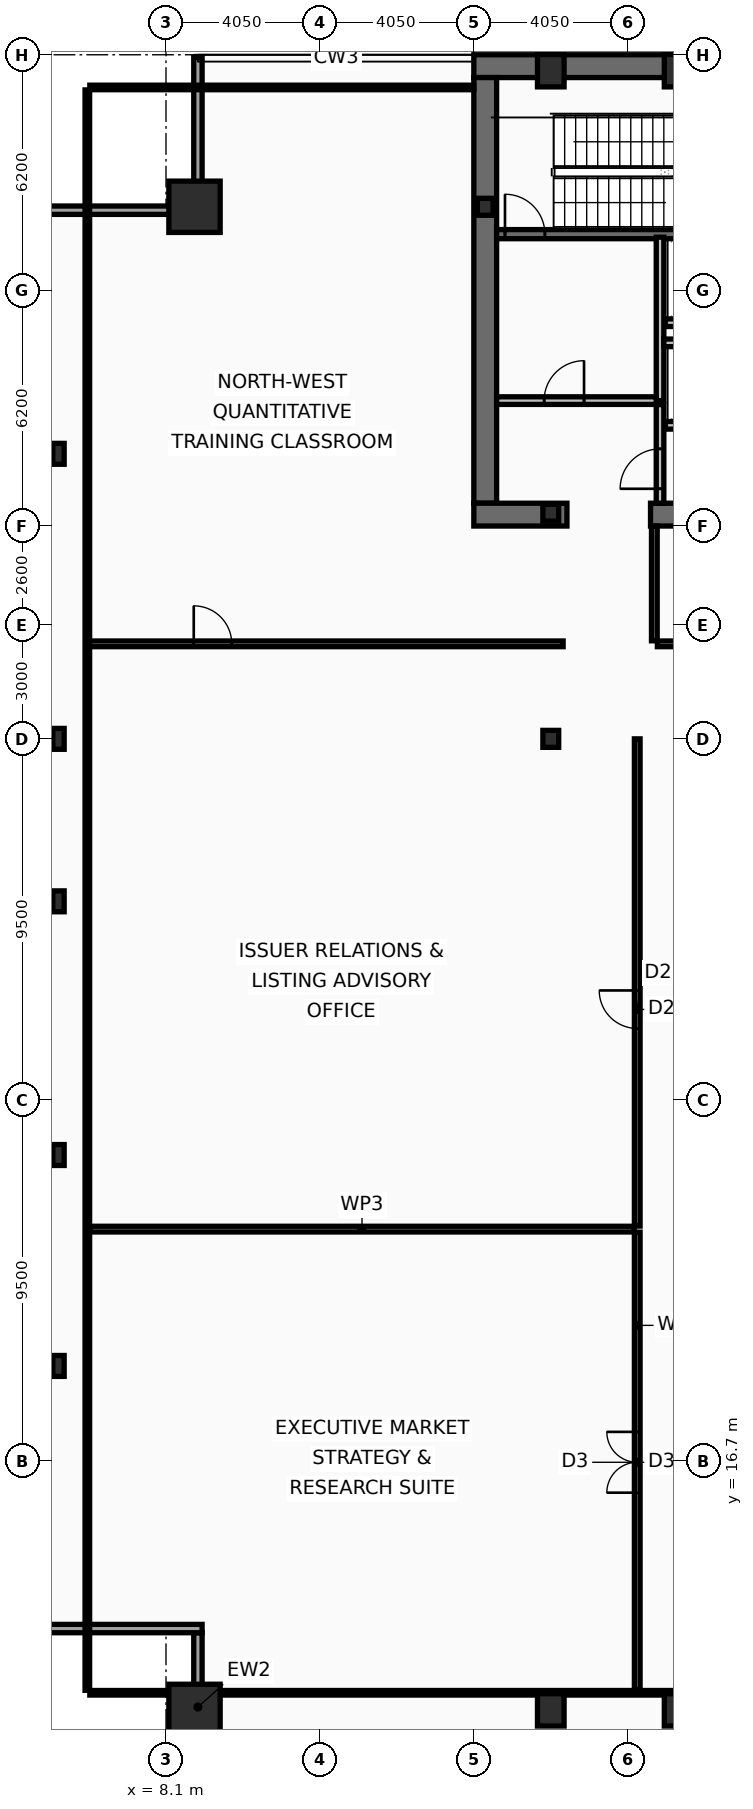
"""IFC4 building model, lengths in metres.
Left out: names, types, materials, properties, quantities, classifications, styles, units other than length and angle.
Written with IfcOpenShell. Run it as: python <this file> out.ifc"""

import sys

from ifc_helpers import new_model, si_unit, direction, frame, frame_2d, origin, origin_2d, place, context, subcontext, project, spatial, rectangle, hollow_rectangle, i_section, extrude, element, fill, save


model = new_model("IFC4")
c1 = context("Model", 3, precision=1e-05, world=origin(), true_north=direction((0.0, 1.0)))
c2 = subcontext(c1, "Body", "Model", "MODEL_VIEW")
j1 = project(units=[si_unit("LENGTHUNIT", "METRE"), si_unit("PLANEANGLEUNIT", "RADIAN")], contexts=[c1])
p1 = place(None, origin())
s1 = spatial("IfcSite", under=j1, at=p1, CompositionType="ELEMENT")
p2 = place(p1, origin())
s2 = spatial("IfcBuilding", under=s1, at=p2, CompositionType="ELEMENT")
p3 = place(p2, frame((0.0, 0.0, 184.2)))
s3 = spatial("IfcBuildingStorey", under=s2, at=p3, CompositionType="ELEMENT", Elevation=184.2)
p4 = place(p3, frame((16.2, 53.4, 0.0), z_axis=(0.0, 0.0, 1.0), x_axis=(1.0, 0.0, 0.0)))
e1 = element("IfcWall", 1, at=p4, inside=s3, PredefinedType="SHEAR", context=c2, shape_type="SweptSolid", body=[
    extrude(rectangle(XDim=40.5, YDim=0.6, at=frame_2d((20.25, 0.0))), origin(), (0.0, 0.0, 1.0), 4.24),
])
p5 = place(p3, frame((16.5, 41.9, 0.0), z_axis=(0.0, 0.0, 1.0), x_axis=(0.0, 1.0, 0.0)))
e2 = element("IfcWall", 2, at=p5, inside=s3, PredefinedType="SHEAR", context=c2, shape_type="SweptSolid", body=[
    extrude(rectangle(XDim=11.2, YDim=0.6, at=frame_2d((5.6, 0.0))), origin(), (0.0, 0.0, 1.0), 4.24),
])
p6 = place(p3, frame((18.65, 41.6, 0.0), z_axis=(0.0, 0.0, 1.0), x_axis=(-1.0, 0.0, 0.0)))
e3 = element("IfcWall", 3, at=p6, inside=s3, PredefinedType="SHEAR", context=c2, shape_type="SweptSolid", body=[
    extrude(rectangle(XDim=2.45, YDim=0.6, at=frame_2d((1.225, 0.0))), origin(), (0.0, 0.0, 1.0), 4.24),
])
p7 = place(p3, frame((32.3, 41.6, 0.0), z_axis=(0.0, 0.0, 1.0), x_axis=(-1.0, 0.0, 0.0)))
e4 = element("IfcWall", 4, at=p7, inside=s3, PredefinedType="SHEAR", context=c2, shape_type="SweptSolid", body=[
    extrude(rectangle(XDim=11.45, YDim=0.6, at=frame_2d((5.725, 0.0))), origin(), (0.0, 0.0, 1.0), 4.24),
])
p8 = place(p3, frame((16.8, 48.98, 0.0), z_axis=(0.0, 0.0, 1.0), x_axis=(1.0, 0.0, 0.0)))
e5 = element("IfcWall", 5, at=p8, inside=s3, PredefinedType="SHEAR", context=c2, shape_type="SweptSolid", body=[
    extrude(rectangle(XDim=7.42, YDim=0.24, at=frame_2d((3.71, 0.0))), origin(), (0.0, 0.0, 1.0), 4.24),
])
p9 = place(p8, frame((0.22, 0.0, 0.0)))
e6 = element("IfcOpeningElement", 6, at=p9, cuts=e5, PredefinedType="OPENING", context=c2, shape_type="SweptSolid", body=[
    extrude(rectangle(XDim=1.05, YDim=2.15, at=frame_2d((0.525, 1.075))), frame((0.0, 0.13, 0.0), z_axis=(0.0, -1.0, 0.0), x_axis=(1.0, 0.0, 0.0)), (0.0, 0.0, 1.0), 0.26),
])
for number, where, z_axis, x_axis in (
    (7, (8.85, 10.15, 0.0), (0.0, 0.0, 1.0), (1.0, 0.0, 0.0)),
    (8, (8.85, 49.7, 0.0), (0.0, 0.0, 1.0), (1.0, 0.0, 0.0)),
):
    element("IfcColumn", number, at=place(p3, frame(where, z_axis=z_axis, x_axis=x_axis)), inside=s3, PredefinedType="COLUMN", context=c2, shape_type="SweptSolid", body=[
        extrude(hollow_rectangle(XDim=1.35, YDim=1.35, WallThickness=0.065, at=origin_2d()), origin(), (0.0, 0.0, 1.0), 4.4),
    ])
for number, where, z_axis, x_axis in (
    (9, (18.225, 10.15, 0.0), (0.0, 0.0, 1.0), (1.0, 0.0, 0.0)),
    (10, (21.562, 10.15, 0.0), (0.0, 0.0, 1.0), (1.0, 0.0, 0.0)),
    (11, (18.225, 53.28, 0.0), (0.0, 0.0, 1.0), (1.0, 0.0, 0.0)),
    (12, (21.562, 53.28, 0.0), (0.0, 0.0, 1.0), (1.0, 0.0, 0.0)),
):
    element("IfcColumn", number, at=place(p3, frame(where, z_axis=z_axis, x_axis=x_axis)), inside=s3, PredefinedType="COLUMN", context=c2, shape_type="SweptSolid", body=[
        extrude(hollow_rectangle(XDim=0.7, YDim=0.85, WallThickness=0.05, at=origin_2d()), origin(), (0.0, 0.0, 1.0), 4.4),
    ])
for number, where, z_axis, x_axis in (
    (13, (5.27, 19.2, 0.0), (0.0, 0.0, 1.0), (1.0, 0.0, 0.0)),
    (14, (5.27, 24.75, 0.0), (0.0, 0.0, 1.0), (1.0, 0.0, 0.0)),
    (15, (5.27, 31.425, 0.0), (0.0, 0.0, 1.0), (1.0, 0.0, 0.0)),
    (16, (5.27, 35.7, 0.0), (0.0, 0.0, 1.0), (1.0, 0.0, 0.0)),
    (17, (5.27, 43.2, 0.0), (0.0, 0.0, 1.0), (1.0, 0.0, 0.0)),
):
    element("IfcColumn", number, at=place(p3, frame(where, z_axis=z_axis, x_axis=x_axis)), inside=s3, PredefinedType="COLUMN", context=c2, shape_type="SweptSolid", body=[
        extrude(i_section(OverallWidth=0.3, OverallDepth=0.55, WebThickness=0.015, FlangeThickness=0.029, at=origin_2d()), origin(), (0.0, 0.0, 1.0), 4.4),
    ])
for number, where, z_axis, x_axis in (
    (18, (16.5, 49.7, 0.0), (0.0, 0.0, 1.0), (1.0, 0.0, 0.0)),
    (19, (18.225, 35.7, 0.0), (0.0, 0.0, 1.0), (1.0, 0.0, 0.0)),
    (20, (18.225, 41.65, 0.0), (0.0, 0.0, 1.0), (1.0, 0.0, 0.0)),
):
    element("IfcColumn", number, at=place(p3, frame(where, z_axis=z_axis, x_axis=x_axis)), inside=s3, PredefinedType="COLUMN", context=c2, shape_type="SweptSolid", body=[
        extrude(i_section(OverallWidth=0.416, OverallDepth=0.446, WebThickness=0.039, FlangeThickness=0.063, at=origin_2d()), origin(), (0.0, 0.0, 1.0), 4.4),
    ])
p10 = place(p3, frame((8.94, 8.27, 0.0), z_axis=(0.0, 0.0, 1.0), x_axis=(0.0, 1.0, 0.0)))
e21 = element("IfcWall", 21, at=p10, inside=s3, PredefinedType="SOLIDWALL", context=c2, shape_type="SweptSolid", body=[
    extrude(rectangle(XDim=3.91, YDim=0.22, at=frame_2d((1.955, 0.0))), origin(), (0.0, 0.0, 1.0), 2.89),
])
p11 = place(p3, frame((9.05, 12.29, 0.0), z_axis=(0.0, 0.0, 1.0), x_axis=(-1.0, 0.0, 0.0)))
e22 = element("IfcWall", 22, at=p11, inside=s3, PredefinedType="SOLIDWALL", context=c2, shape_type="SweptSolid", body=[
    extrude(rectangle(XDim=4.13, YDim=0.22, at=frame_2d((2.065, 0.0))), origin(), (0.0, 0.0, 1.0), 3.63),
])
p12 = place(p3, frame((4.92, 49.61, 0.0), z_axis=(0.0, 0.0, 1.0), x_axis=(1.0, 0.0, 0.0)))
e23 = element("IfcWall", 23, at=p12, inside=s3, PredefinedType="SOLIDWALL", context=c2, shape_type="SweptSolid", body=[
    extrude(rectangle(XDim=4.13, YDim=0.22, at=frame_2d((2.065, 0.0))), origin(), (0.0, 0.0, 1.0), 2.89),
])
p13 = place(p3, frame((8.94, 49.72, 0.0), z_axis=(0.0, 0.0, 1.0), x_axis=(0.0, 1.0, 0.0)))
e24 = element("IfcWall", 24, at=p13, inside=s3, PredefinedType="SOLIDWALL", context=c2, shape_type="SweptSolid", body=[
    extrude(rectangle(XDim=3.91, YDim=0.22, at=frame_2d((1.955, 0.0))), origin(), (0.0, 0.0, 1.0), 2.89),
])
p14 = place(p3, frame((24.21, 43.95, 0.0), z_axis=(0.0, 0.0, 1.0), x_axis=(-1.0, 0.0, 0.0)))
e25 = element("IfcWall", 25, at=p14, inside=s3, PredefinedType="PARTITIONING", context=c2, shape_type="SweptSolid", body=[
    extrude(rectangle(XDim=2.97, YDim=0.2, at=frame_2d((1.485, 0.0))), origin(), (0.0, 0.0, 1.0), 4.24),
])
p15 = place(p14, frame((0.86, 0.0, 0.0)))
e26 = element("IfcOpeningElement", 26, at=p15, cuts=e25, PredefinedType="OPENING", context=c2, shape_type="SweptSolid", body=[
    extrude(rectangle(XDim=1.3, YDim=2.18, at=frame_2d((0.65, 1.09))), frame((0.0, 0.11, 0.0), z_axis=(0.0, -1.0, 0.0), x_axis=(1.0, 0.0, 0.0)), (0.0, 0.0, 1.0), 0.22),
])
p16 = place(p3, frame((24.21, 46.65, 0.0), z_axis=(0.0, 0.0, 1.0), x_axis=(-1.0, 0.0, 0.0)))
e27 = element("IfcWall", 27, at=p16, inside=s3, PredefinedType="PARTITIONING", context=c2, shape_type="SweptSolid", body=[
    extrude(rectangle(XDim=2.97, YDim=0.2, at=frame_2d((1.485, 0.0))), origin(), (0.0, 0.0, 1.0), 4.24),
])
p17 = place(p16, frame((0.91, 0.0, 0.0)))
e28 = element("IfcOpeningElement", 28, at=p17, cuts=e27, PredefinedType="OPENING", context=c2, shape_type="SweptSolid", body=[
    extrude(rectangle(XDim=1.2, YDim=2.18, at=frame_2d((0.6, 1.09))), frame((0.0, 0.11, 0.0), z_axis=(0.0, -1.0, 0.0), x_axis=(1.0, 0.0, 0.0)), (0.0, 0.0, 1.0), 0.22),
])
p18 = place(p3, frame((21.1, 44.6, 0.0), z_axis=(0.0, 0.0, 1.0), x_axis=(0.0, 1.0, 0.0)))
e29 = element("IfcWall", 29, at=p18, inside=s3, PredefinedType="PARTITIONING", context=c2, shape_type="SweptSolid", body=[
    extrude(rectangle(XDim=4.3, YDim=0.2, at=frame_2d((2.15, 0.0))), origin(), (0.0, 0.0, 1.0), 4.24),
])
p19 = place(p3, frame((16.8, 44.6, 0.0), z_axis=(0.0, 0.0, 1.0), x_axis=(1.0, 0.0, 0.0)))
e30 = element("IfcWall", 30, at=p19, inside=s3, PredefinedType="PARTITIONING", context=c2, shape_type="SweptSolid", body=[
    extrude(rectangle(XDim=4.2, YDim=0.2, at=frame_2d((2.1, 0.0))), origin(), (0.0, 0.0, 1.0), 4.24),
])
p20 = place(p19, frame((1.25, 0.0, 0.0)))
e31 = element("IfcOpeningElement", 31, at=p20, cuts=e30, PredefinedType="OPENING", context=c2, shape_type="SweptSolid", body=[
    extrude(rectangle(XDim=1.05, YDim=2.15, at=frame_2d((0.525, 1.075))), frame((0.0, 0.11, 0.0), z_axis=(0.0, -1.0, 0.0), x_axis=(1.0, 0.0, 0.0)), (0.0, 0.0, 1.0), 0.22),
])
p21 = place(p3, frame((21.2, 46.12, 0.0), z_axis=(0.0, 0.0, 1.0), x_axis=(1.0, 0.0, 0.0)))
e32 = element("IfcWall", 32, at=p21, inside=s3, PredefinedType="PARTITIONING", context=c2, shape_type="SweptSolid", body=[
    extrude(rectangle(XDim=3.02, YDim=0.2, at=frame_2d((1.51, 0.0))), origin(), (0.0, 0.0, 1.0), 4.24),
])
p22 = place(p3, frame((21.1, 41.9, 0.0), z_axis=(0.0, 0.0, 1.0), x_axis=(0.0, 1.0, 0.0)))
e33 = element("IfcWall", 33, at=p22, inside=s3, PredefinedType="PARTITIONING", context=c2, shape_type="SweptSolid", body=[
    extrude(rectangle(XDim=2.595, YDim=0.2, at=frame_2d((1.298, 0.0))), origin(), (0.0, 0.0, 1.0), 4.24),
])
p23 = place(p22, frame((0.38, 0.0, 0.0)))
e34 = element("IfcOpeningElement", 34, at=p23, cuts=e33, PredefinedType="OPENING", context=c2, shape_type="SweptSolid", body=[
    extrude(rectangle(XDim=1.05, YDim=2.15, at=frame_2d((0.525, 1.075))), frame((0.0, 0.11, 0.0), z_axis=(0.0, -1.0, 0.0), x_axis=(1.0, 0.0, 0.0)), (0.0, 0.0, 1.0), 0.22),
])
p24 = place(p3, frame((20.5, 10.665, 0.0), z_axis=(0.0, 0.0, 1.0), x_axis=(0.0, 1.0, 0.0)))
e35 = element("IfcWall", 35, at=p24, inside=s3, PredefinedType="PARTITIONING", context=c2, shape_type="SweptSolid", body=[
    extrude(rectangle(XDim=12.055, YDim=0.15, at=frame_2d((6.027, 0.0))), origin(), (0.0, 0.0, 1.0), 3.73),
])
p25 = place(p24, frame((5.2, 0.0, 0.0)))
e36 = element("IfcOpeningElement", 36, at=p25, cuts=e35, PredefinedType="OPENING", context=c2, shape_type="SweptSolid", body=[
    extrude(rectangle(XDim=1.6, YDim=2.15, at=frame_2d((0.8, 1.075))), frame((0.0, 0.085, 0.0), z_axis=(0.0, -1.0, 0.0), x_axis=(1.0, 0.0, 0.0)), (0.0, 0.0, 1.0), 0.17),
])
p26 = place(p3, frame((20.5, 22.88, 0.0), z_axis=(0.0, 0.0, 1.0), x_axis=(0.0, 1.0, 0.0)))
e37 = element("IfcWall", 37, at=p26, inside=s3, PredefinedType="PARTITIONING", context=c2, shape_type="SweptSolid", body=[
    extrude(rectangle(XDim=12.82, YDim=0.15, at=frame_2d((6.41, 0.0))), origin(), (0.0, 0.0, 1.0), 3.73),
])
p27 = place(p26, frame((5.2, 0.0, 0.0)))
e38 = element("IfcOpeningElement", 38, at=p27, cuts=e37, PredefinedType="OPENING", context=c2, shape_type="SweptSolid", body=[
    extrude(rectangle(XDim=1.0, YDim=2.05, at=frame_2d((0.5, 1.025))), frame((0.0, 0.085, 0.0), z_axis=(0.0, -1.0, 0.0), x_axis=(1.0, 0.0, 0.0)), (0.0, 0.0, 1.0), 0.17),
])
p28 = place(p3, frame((6.095, 22.8, 0.0), z_axis=(0.0, 0.0, 1.0), x_axis=(1.0, 0.0, 0.0)))
e39 = element("IfcWall", 39, at=p28, inside=s3, PredefinedType="PARTITIONING", context=c2, shape_type="SweptSolid", body=[
    extrude(rectangle(XDim=14.325, YDim=0.15, at=frame_2d((7.163, 0.0))), origin(), (0.0, 0.0, 1.0), 3.33),
])
p29 = place(p3, frame((21.03, 38.2, 0.0), z_axis=(0.0, 0.0, 1.0), x_axis=(1.0, 0.0, 0.0)))
e40 = element("IfcWall", 40, at=p29, inside=s3, PredefinedType="PARTITIONING", context=c2, shape_type="SweptSolid", body=[
    extrude(rectangle(XDim=3.69, YDim=0.15, at=frame_2d((1.845, 0.0))), origin(), (0.0, 0.0, 1.0), 3.53),
])
p30 = place(p29, frame((1.2, 0.0, 0.0)))
e41 = element("IfcOpeningElement", 41, at=p30, cuts=e40, PredefinedType="OPENING", context=c2, shape_type="SweptSolid", body=[
    extrude(rectangle(XDim=0.95, YDim=2.05, at=frame_2d((0.475, 1.025))), frame((0.0, 0.085, 0.0), z_axis=(0.0, -1.0, 0.0), x_axis=(1.0, 0.0, 0.0)), (0.0, 0.0, 1.0), 0.17),
])
p31 = place(p3, frame((20.95, 38.28, 0.0), z_axis=(0.0, 0.0, 1.0), x_axis=(0.0, 1.0, 0.0)))
e42 = element("IfcWall", 42, at=p31, inside=s3, PredefinedType="PARTITIONING", context=c2, shape_type="SweptSolid", body=[
    extrude(rectangle(XDim=3.02, YDim=0.15, at=frame_2d((1.51, 0.0))), origin(), (0.0, 0.0, 1.0), 4.24),
])
p32 = place(p3, frame((6.03, 38.2, 0.0), z_axis=(0.0, 0.0, 1.0), x_axis=(1.0, 0.0, 0.0)))
e43 = element("IfcWall", 43, at=p32, inside=s3, PredefinedType="PARTITIONING", context=c2, shape_type="SweptSolid", body=[
    extrude(rectangle(XDim=12.52, YDim=0.15, at=frame_2d((6.26, 0.0))), origin(), (0.0, 0.0, 1.0), 3.53),
])
p33 = place(p32, frame((2.8, 0.0, 0.0)))
e44 = element("IfcOpeningElement", 44, at=p33, cuts=e43, PredefinedType="OPENING", context=c2, shape_type="SweptSolid", body=[
    extrude(rectangle(XDim=1.0, YDim=2.05, at=frame_2d((0.5, 1.025))), frame((0.0, 0.085, 0.0), z_axis=(0.0, -1.0, 0.0), x_axis=(1.0, 0.0, 0.0)), (0.0, 0.0, 1.0), 0.17),
])
p34 = place(p3, frame((6.03, 10.665, 0.0), z_axis=(0.0, 0.0, 1.0), x_axis=(0.0, 1.0, 0.0)))
e45 = element("IfcWall", 45, at=p34, inside=s3, PredefinedType="PARTITIONING", context=c2, shape_type="SweptSolid", body=[
    extrude(rectangle(XDim=42.11, YDim=0.12, at=frame_2d((21.055, 0.0))), origin(), (0.0, 0.0, 1.0), 2.63),
])
p35 = place(p3, frame((6.095, 52.84, 0.0), z_axis=(0.0, 0.0, 1.0), x_axis=(1.0, 0.0, 0.0)))
e46 = element("IfcWall", 46, at=p35, inside=s3, PredefinedType="PARTITIONING", context=c2, shape_type="SweptSolid", body=[
    extrude(rectangle(XDim=10.105, YDim=0.12, at=frame_2d((5.052, 0.0))), origin(), (0.0, 0.0, 1.0), 4.24),
])
p36 = place(p3, frame((6.095, 10.6, 0.0), z_axis=(0.0, 0.0, 1.0), x_axis=(1.0, 0.0, 0.0)))
e47 = element("IfcWall", 47, at=p36, inside=s3, PredefinedType="PARTITIONING", context=c2, shape_type="SweptSolid", body=[
    extrude(rectangle(XDim=60.71, YDim=0.12, at=frame_2d((30.355, 0.0))), origin(), (0.0, 0.0, 1.0), 2.89),
])
p37 = place(p9, origin())
e48 = element("IfcDoor", 48, at=p37, inside=s3, OperationType="SINGLE_SWING_LEFT", PredefinedType="DOOR", context=c2, shape_type="SweptSolid", body=[
    extrude(rectangle(XDim=1.05, YDim=2.15, at=frame_2d((0.525, 1.075))), frame((0.0, 0.025, 0.0), z_axis=(0.0, -1.0, 0.0), x_axis=(1.0, 0.0, 0.0)), (0.0, 0.0, 1.0), 0.05),
])
fill(e6, e48)
p38 = place(p20, origin())
e49 = element("IfcDoor", 49, at=p38, inside=s3, OperationType="SINGLE_SWING_RIGHT", PredefinedType="DOOR", context=c2, shape_type="SweptSolid", body=[
    extrude(rectangle(XDim=1.05, YDim=2.15, at=frame_2d((0.525, 1.075))), frame((0.0, 0.025, 0.0), z_axis=(0.0, -1.0, 0.0), x_axis=(1.0, 0.0, 0.0)), (0.0, 0.0, 1.0), 0.05),
])
fill(e31, e49)
p39 = place(p23, origin())
e50 = element("IfcDoor", 50, at=p39, inside=s3, OperationType="SINGLE_SWING_LEFT", PredefinedType="DOOR", context=c2, shape_type="SweptSolid", body=[
    extrude(rectangle(XDim=1.05, YDim=2.15, at=frame_2d((0.525, 1.075))), frame((0.0, 0.025, 0.0), z_axis=(0.0, -1.0, 0.0), x_axis=(1.0, 0.0, 0.0)), (0.0, 0.0, 1.0), 0.05),
])
fill(e34, e50)
p40 = place(p25, origin())
e51 = element("IfcDoor", 51, at=p40, inside=s3, OperationType="DOUBLE_DOOR_SINGLE_SWING", PredefinedType="DOOR", context=c2, shape_type="SweptSolid", body=[
    extrude(rectangle(XDim=1.6, YDim=2.15, at=frame_2d((0.8, 1.075))), frame((0.0, 0.025, 0.0), z_axis=(0.0, -1.0, 0.0), x_axis=(1.0, 0.0, 0.0)), (0.0, 0.0, 1.0), 0.05),
])
fill(e36, e51)
p41 = place(p27, origin())
e52 = element("IfcDoor", 52, at=p41, inside=s3, OperationType="SINGLE_SWING_RIGHT", PredefinedType="DOOR", context=c2, shape_type="SweptSolid", body=[
    extrude(rectangle(XDim=1.0, YDim=2.05, at=frame_2d((0.5, 1.025))), frame((0.0, 0.025, 0.0), z_axis=(0.0, -1.0, 0.0), x_axis=(1.0, 0.0, 0.0)), (0.0, 0.0, 1.0), 0.05),
])
fill(e38, e52)
p42 = place(p33, origin())
e53 = element("IfcDoor", 53, at=p42, inside=s3, OperationType="SINGLE_SWING_LEFT", PredefinedType="DOOR", context=c2, shape_type="SweptSolid", body=[
    extrude(rectangle(XDim=1.0, YDim=2.05, at=frame_2d((0.5, 1.025))), frame((0.0, 0.025, 0.0), z_axis=(0.0, -1.0, 0.0), x_axis=(1.0, 0.0, 0.0)), (0.0, 0.0, 1.0), 0.05),
])
fill(e44, e53)
save(model, sys.argv[1])
